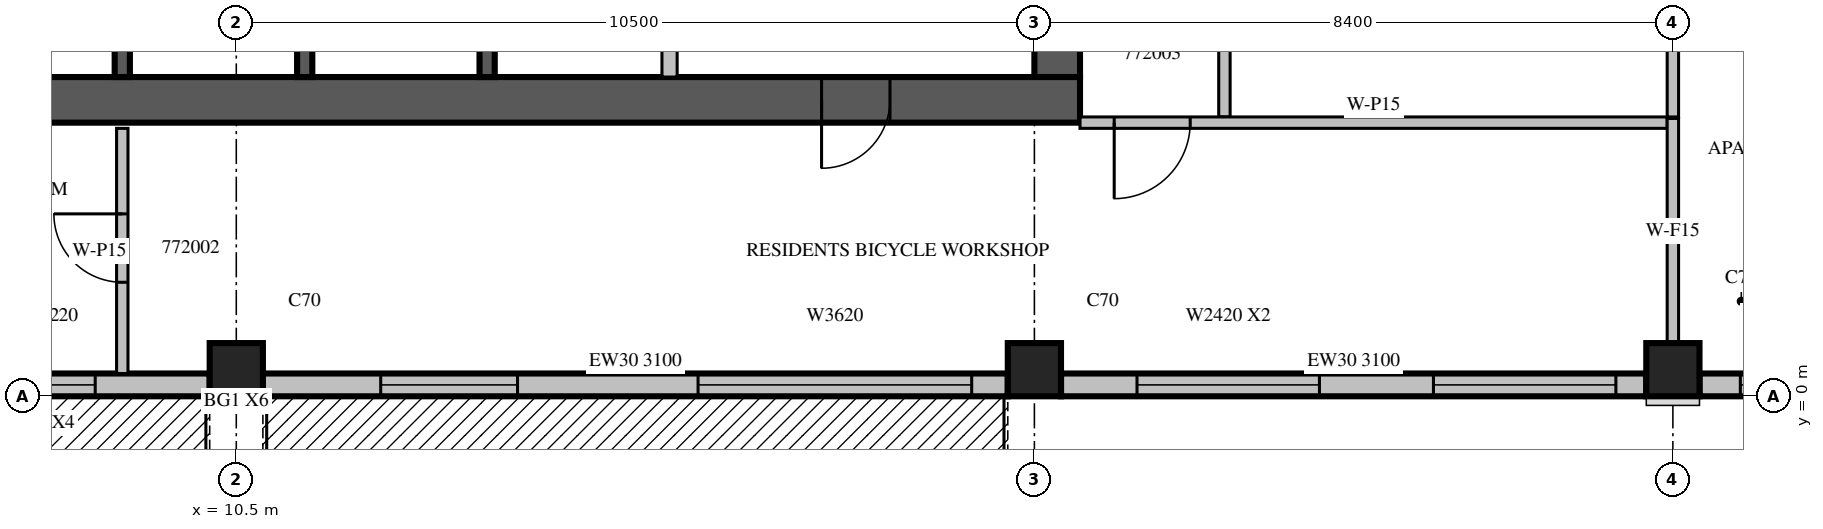
"""IFC4 building model, lengths in metres.
Left out: names, types, materials, properties, quantities, classifications, styles, units other than length and angle.
Written with IfcOpenShell. Run it as: python <this file> out.ifc"""

import sys

from ifc_helpers import new_model, si_unit, direction, frame, frame_2d, origin, origin_2d, place, context, subcontext, project, spatial, rectangle, extrude, source, transform, mapped, element, fill, save


model = new_model("IFC4")
c1 = context("Model", 3, precision=1e-05, world=origin(), true_north=direction((0.0, 1.0)))
c2 = subcontext(c1, "Body", "Model", "MODEL_VIEW")
j1 = project(units=[si_unit("LENGTHUNIT", "METRE"), si_unit("PLANEANGLEUNIT", "RADIAN")], contexts=[c1])
p1 = place(None, origin())
s1 = spatial("IfcSite", under=j1, at=p1, CompositionType="ELEMENT")
p2 = place(p1, origin())
s2 = spatial("IfcBuilding", under=s1, at=p2, CompositionType="ELEMENT")
p3 = place(p2, frame((0.0, 0.0, 312.5)))
s3 = spatial("IfcBuildingStorey", under=s2, at=p3, CompositionType="ELEMENT", Elevation=312.5)
m1 = source(origin(), c2, "Body", "SweptSolid", [
    extrude(rectangle(XDim=0.7, YDim=0.7, at=origin_2d()), origin(), (0.0, 0.0, 1.0), 3.5),
])
for number, where, z_axis, x_axis in (
    (1, (10.5, 0.35, 0.0), (0.0, 0.0, 1.0), (1.0, 0.0, 0.0)),
    (2, (21.0, 0.35, 0.0), (0.0, 0.0, 1.0), (1.0, 0.0, 0.0)),
    (3, (29.4, 0.35, 0.0), (0.0, 0.0, 1.0), (1.0, 0.0, 0.0)),
):
    element("IfcColumn", number, at=place(p3, frame(where, z_axis=z_axis, x_axis=x_axis)), inside=s3, PredefinedType="COLUMN", context=c2, shape_type="MappedRepresentation", body=[
        mapped(m1, transform((0.0, 0.0, 0.0), scale=1.0)),
    ])
m2 = source(origin(), c2, "Body", "SweptSolid", [
    extrude(rectangle(XDim=6.3, YDim=0.6, at=frame_2d((3.15, 0.0))), origin(), (0.0, 0.0, 1.0), 3.5),
])
p4 = place(p3, frame((21.3, 4.2, 0.0), z_axis=(0.0, 0.0, 1.0), x_axis=(0.0, 1.0, 0.0)))
e4 = element("IfcWall", 4, at=p4, inside=s3, PredefinedType="SHEAR", context=c2, shape_type="MappedRepresentation", body=[
    mapped(m2, transform((0.0, 0.0, 0.0), scale=1.0)),
])
m3 = source(origin(), c2, "Body", "SweptSolid", [
    extrude(rectangle(XDim=2.2, YDim=2.1, at=frame_2d((1.1, 1.05))), frame((0.0, 0.31, 0.0), z_axis=(0.0, -1.0, 0.0), x_axis=(1.0, 0.0, 0.0)), (0.0, 0.0, 1.0), 0.62),
])
p5 = place(p4, frame((4.0, 0.0, 0.0)))
e5 = element("IfcOpeningElement", 5, at=p5, cuts=e4, PredefinedType="OPENING", context=c2, shape_type="MappedRepresentation", body=[
    mapped(m3, transform((0.0, 0.0, 0.0), scale=1.0)),
])
m4 = source(origin(), c2, "Body", "SweptSolid", [
    extrude(rectangle(XDim=17.4, YDim=0.6, at=frame_2d((8.7, 0.0))), origin(), (0.0, 0.0, 1.0), 3.5),
])
p6 = place(p3, frame((4.2, 3.9, 0.0), z_axis=(0.0, 0.0, 1.0), x_axis=(1.0, 0.0, 0.0)))
e6 = element("IfcWall", 6, at=p6, inside=s3, PredefinedType="SHEAR", context=c2, shape_type="MappedRepresentation", body=[
    mapped(m4, transform((0.0, 0.0, 0.0), scale=1.0)),
])
m5 = source(origin(), c2, "Body", "SweptSolid", [
    extrude(rectangle(XDim=0.9, YDim=2.1, at=frame_2d((0.45, 1.05))), frame((0.0, 0.31, 0.0), z_axis=(0.0, -1.0, 0.0), x_axis=(1.0, 0.0, 0.0)), (0.0, 0.0, 1.0), 0.62),
])
p7 = place(p6, frame((14.0, 0.0, 0.0)))
e7 = element("IfcOpeningElement", 7, at=p7, cuts=e6, PredefinedType="OPENING", context=c2, shape_type="MappedRepresentation", body=[
    mapped(m5, transform((0.0, 0.0, 0.0), scale=1.0)),
])
m6 = source(origin(), c2, "Body", "SweptSolid", [
    extrude(rectangle(XDim=5.95, YDim=0.3, at=frame_2d((2.975, 0.0))), origin(), (0.0, 0.0, 1.0), 3.1),
])
p8 = place(p3, frame((4.2, 0.15, 0.0), z_axis=(0.0, 0.0, 1.0), x_axis=(1.0, 0.0, 0.0)))
e8 = element("IfcWall", 8, at=p8, inside=s3, PredefinedType="STANDARD", context=c2, shape_type="MappedRepresentation", body=[
    mapped(m6, transform((0.0, 0.0, 0.0), scale=1.0)),
])
m7 = source(origin(), c2, "Body", "SweptSolid", [
    extrude(rectangle(XDim=1.8, YDim=2.4, at=frame_2d((0.9, 1.2))), frame((0.0, 0.16, 0.0), z_axis=(0.0, -1.0, 0.0), x_axis=(1.0, 0.0, 0.0)), (0.0, 0.0, 1.0), 0.32),
])
p9 = place(p8, frame((0.675, 0.0, 0.0)))
e9 = element("IfcOpeningElement", 9, at=p9, cuts=e8, PredefinedType="OPENING", context=c2, shape_type="MappedRepresentation", body=[
    mapped(m7, transform((0.0, 0.0, 0.0), scale=1.0)),
])
m8 = source(origin(), c2, "Body", "SweptSolid", [
    extrude(rectangle(XDim=1.2, YDim=2.0, at=frame_2d((0.6, 1.0))), frame((0.0, 0.16, 0.0), z_axis=(0.0, -1.0, 0.0), x_axis=(1.0, 0.0, 0.0)), (0.0, 0.0, 1.0), 0.32),
])
p10 = place(p8, frame((3.244, 0.0, 0.6)))
e10 = element("IfcOpeningElement", 10, at=p10, cuts=e8, PredefinedType="OPENING", context=c2, shape_type="MappedRepresentation", body=[
    mapped(m8, transform((0.0, 0.0, 0.0), scale=1.0)),
])
m9 = source(origin(), c2, "Body", "SweptSolid", [
    extrude(rectangle(XDim=9.8, YDim=0.3, at=frame_2d((4.9, 0.0))), origin(), (0.0, 0.0, 1.0), 3.1),
])
p11 = place(p3, frame((10.85, 0.15, 0.0), z_axis=(0.0, 0.0, 1.0), x_axis=(1.0, 0.0, 0.0)))
e11 = element("IfcWall", 11, at=p11, inside=s3, PredefinedType="STANDARD", context=c2, shape_type="MappedRepresentation", body=[
    mapped(m9, transform((0.0, 0.0, 0.0), scale=1.0)),
])
p12 = place(p11, frame((1.55, 0.0, 0.0)))
e12 = element("IfcOpeningElement", 12, at=p12, cuts=e11, PredefinedType="OPENING", context=c2, shape_type="MappedRepresentation", body=[
    mapped(m7, transform((0.0, 0.0, 0.0), scale=1.0)),
])
m10 = source(origin(), c2, "Body", "SweptSolid", [
    extrude(rectangle(XDim=3.6, YDim=2.0, at=frame_2d((1.8, 1.0))), frame((0.0, 0.16, 0.0), z_axis=(0.0, -1.0, 0.0), x_axis=(1.0, 0.0, 0.0)), (0.0, 0.0, 1.0), 0.32),
])
p13 = place(p11, frame((5.725, 0.0, 0.6)))
e13 = element("IfcOpeningElement", 13, at=p13, cuts=e11, PredefinedType="OPENING", context=c2, shape_type="MappedRepresentation", body=[
    mapped(m10, transform((0.0, 0.0, 0.0), scale=1.0)),
])
m11 = source(origin(), c2, "Body", "SweptSolid", [
    extrude(rectangle(XDim=7.7, YDim=0.3, at=frame_2d((3.85, 0.0))), origin(), (0.0, 0.0, 1.0), 3.1),
])
p14 = place(p3, frame((21.35, 0.15, 0.0), z_axis=(0.0, 0.0, 1.0), x_axis=(1.0, 0.0, 0.0)))
e14 = element("IfcWall", 14, at=p14, inside=s3, PredefinedType="STANDARD", context=c2, shape_type="MappedRepresentation", body=[
    mapped(m11, transform((0.0, 0.0, 0.0), scale=1.0)),
])
m12 = source(origin(), c2, "Body", "SweptSolid", [
    extrude(rectangle(XDim=2.4, YDim=2.0, at=frame_2d((1.2, 1.0))), frame((0.0, 0.16, 0.0), z_axis=(0.0, -1.0, 0.0), x_axis=(1.0, 0.0, 0.0)), (0.0, 0.0, 1.0), 0.32),
])
p15 = place(p14, frame((1.0, 0.0, 0.6)))
e15 = element("IfcOpeningElement", 15, at=p15, cuts=e14, PredefinedType="OPENING", context=c2, shape_type="MappedRepresentation", body=[
    mapped(m12, transform((0.0, 0.0, 0.0), scale=1.0)),
])
p16 = place(p14, frame((4.9, 0.0, 0.6)))
e16 = element("IfcOpeningElement", 16, at=p16, cuts=e14, PredefinedType="OPENING", context=c2, shape_type="MappedRepresentation", body=[
    mapped(m12, transform((0.0, 0.0, 0.0), scale=1.0)),
])
p17 = place(p3, frame((29.75, 0.15, 0.0), z_axis=(0.0, 0.0, 1.0), x_axis=(1.0, 0.0, 0.0)))
e17 = element("IfcWall", 17, at=p17, inside=s3, PredefinedType="STANDARD", context=c2, shape_type="MappedRepresentation", body=[
    mapped(m11, transform((0.0, 0.0, 0.0), scale=1.0)),
])
p18 = place(p17, frame((0.537, 0.0, 0.6)))
e18 = element("IfcOpeningElement", 18, at=p18, cuts=e17, PredefinedType="OPENING", context=c2, shape_type="MappedRepresentation", body=[
    mapped(m8, transform((0.0, 0.0, 0.0), scale=1.0)),
])
p19 = place(p17, frame((6.062, 0.0, 0.6)))
e19 = element("IfcOpeningElement", 19, at=p19, cuts=e17, PredefinedType="OPENING", context=c2, shape_type="MappedRepresentation", body=[
    mapped(m8, transform((0.0, 0.0, 0.0), scale=1.0)),
])
m13 = source(origin(), c2, "Body", "SweptSolid", [
    extrude(rectangle(XDim=3.1, YDim=0.2, at=frame_2d((1.55, 0.0))), origin(), (0.0, 0.0, 1.0), 3.5),
])
for number, where, z_axis, x_axis in (
    (20, (9.0, 4.2, 0.0), (0.0, 0.0, 1.0), (0.0, 1.0, 0.0)),
    (21, (11.4, 4.2, 0.0), (0.0, 0.0, 1.0), (0.0, 1.0, 0.0)),
):
    element("IfcWall", number, at=place(p3, frame(where, z_axis=z_axis, x_axis=x_axis)), inside=s3, PredefinedType="SOLIDWALL", context=c2, shape_type="MappedRepresentation", body=[
        mapped(m13, transform((0.0, 0.0, 0.0), scale=1.0)),
    ])
m14 = source(origin(), c2, "Body", "SweptSolid", [
    extrude(rectangle(XDim=3.1, YDim=0.2, at=frame_2d((1.55, 0.0))), origin(), (0.0, 0.0, 1.0), 3.1),
])
p20 = place(p3, frame((13.8, 4.2, 0.0), z_axis=(0.0, 0.0, 1.0), x_axis=(0.0, 1.0, 0.0)))
e22 = element("IfcWall", 22, at=p20, inside=s3, PredefinedType="SOLIDWALL", context=c2, shape_type="MappedRepresentation", body=[
    mapped(m14, transform((0.0, 0.0, 0.0), scale=1.0)),
])
m15 = source(origin(), c2, "Body", "SweptSolid", [
    extrude(rectangle(XDim=3.1, YDim=0.2, at=frame_2d((1.55, 0.0))), origin(), (0.0, 0.0, 1.0), 3.1),
])
p21 = place(p3, frame((16.2, 4.2, 0.0), z_axis=(0.0, 0.0, 1.0), x_axis=(0.0, 1.0, 0.0)))
e23 = element("IfcWall", 23, at=p21, inside=s3, PredefinedType="PARTITIONING", context=c2, shape_type="MappedRepresentation", body=[
    mapped(m15, transform((0.0, 0.0, 0.0), scale=1.0)),
])
m16 = source(origin(), c2, "Body", "SweptSolid", [
    extrude(rectangle(XDim=4.275, YDim=0.15, at=frame_2d((2.138, 0.0))), origin(), (0.0, 0.0, 1.0), 3.1),
])
for number, where, z_axis, x_axis in (
    (24, (23.5, 7.95, 0.0), (0.0, 0.0, 1.0), (0.0, -1.0, 0.0)),
    (25, (29.4, 3.675, 0.0), (0.0, 0.0, 1.0), (0.0, 1.0, 0.0)),
):
    element("IfcWall", number, at=place(p3, frame(where, z_axis=z_axis, x_axis=x_axis)), inside=s3, PredefinedType="PARTITIONING", context=c2, shape_type="MappedRepresentation", body=[
        mapped(m16, transform((0.0, 0.0, 0.0), scale=1.0)),
    ])
m17 = source(origin(), c2, "Body", "SweptSolid", [
    extrude(rectangle(XDim=3.225, YDim=0.15, at=frame_2d((1.613, 0.0))), origin(), (0.0, 0.0, 1.0), 3.1),
])
p22 = place(p3, frame((9.0, 3.525, 0.0), z_axis=(0.0, 0.0, 1.0), x_axis=(0.0, -1.0, 0.0)))
e26 = element("IfcWall", 26, at=p22, inside=s3, PredefinedType="PARTITIONING", context=c2, shape_type="MappedRepresentation", body=[
    mapped(m17, transform((0.0, 0.0, 0.0), scale=1.0)),
])
m18 = source(origin(), c2, "Body", "SweptSolid", [
    extrude(rectangle(XDim=0.9, YDim=2.1, at=frame_2d((0.45, 1.05))), frame((0.0, 0.085, 0.0), z_axis=(0.0, -1.0, 0.0), x_axis=(1.0, 0.0, 0.0)), (0.0, 0.0, 1.0), 0.17),
])
p23 = place(p22, frame((1.125, 0.0, 0.0)))
e27 = element("IfcOpeningElement", 27, at=p23, cuts=e26, PredefinedType="OPENING", context=c2, shape_type="MappedRepresentation", body=[
    mapped(m18, transform((0.0, 0.0, 0.0), scale=1.0)),
])
m19 = source(origin(), c2, "Body", "SweptSolid", [
    extrude(rectangle(XDim=7.725, YDim=0.15, at=frame_2d((3.862, 0.0))), origin(), (0.0, 0.0, 1.0), 3.1),
])
p24 = place(p3, frame((21.6, 3.6, 0.0), z_axis=(0.0, 0.0, 1.0), x_axis=(1.0, 0.0, 0.0)))
e28 = element("IfcWall", 28, at=p24, inside=s3, PredefinedType="PARTITIONING", context=c2, shape_type="MappedRepresentation", body=[
    mapped(m19, transform((0.0, 0.0, 0.0), scale=1.0)),
])
m20 = source(origin(), c2, "Body", "SweptSolid", [
    extrude(rectangle(XDim=1.0, YDim=2.1, at=frame_2d((0.5, 1.05))), frame((0.0, 0.085, 0.0), z_axis=(0.0, -1.0, 0.0), x_axis=(1.0, 0.0, 0.0)), (0.0, 0.0, 1.0), 0.17),
])
p25 = place(p24, frame((0.45, 0.0, 0.0)))
e29 = element("IfcOpeningElement", 29, at=p25, cuts=e28, PredefinedType="OPENING", context=c2, shape_type="MappedRepresentation", body=[
    mapped(m20, transform((0.0, 0.0, 0.0), scale=1.0)),
])
m21 = source(origin(), c2, "Body", "SweptSolid", [
    extrude(rectangle(XDim=2.956, YDim=0.15, at=frame_2d((1.478, 0.0))), origin(), (0.0, 0.0, 1.0), 3.1),
])
p26 = place(p3, frame((29.4, 0.699, 0.0), z_axis=(0.0, 0.0, 1.0), x_axis=(0.0, 1.0, 0.0)))
e30 = element("IfcWall", 30, at=p26, inside=s3, PredefinedType="PARTITIONING", context=c2, shape_type="MappedRepresentation", body=[
    mapped(m21, transform((0.0, 0.0, 0.0), scale=1.0)),
])
m22 = source(origin(), c2, "Body", "SweptSolid", [
    extrude(rectangle(XDim=1.2, YDim=2.0, at=frame_2d((0.6, 1.0))), frame((0.0, 0.03, 0.0), z_axis=(0.0, -1.0, 0.0), x_axis=(1.0, 0.0, 0.0)), (0.0, 0.0, 1.0), 0.06),
])
p27 = place(p10, origin())
e31 = element("IfcWindow", 31, at=p27, inside=s3, PartitioningType="SINGLE_PANEL", PredefinedType="WINDOW", context=c2, shape_type="MappedRepresentation", body=[
    mapped(m22, transform((0.0, 0.0, 0.0), scale=1.0)),
])
fill(e10, e31)
m23 = source(origin(), c2, "Body", "SweptSolid", [
    extrude(rectangle(XDim=1.8, YDim=2.4, at=frame_2d((0.9, 1.2))), frame((0.0, 0.025, 0.0), z_axis=(0.0, -1.0, 0.0), x_axis=(1.0, 0.0, 0.0)), (0.0, 0.0, 1.0), 0.05),
])
p28 = place(p12, origin())
e32 = element("IfcDoor", 32, at=p28, inside=s3, OperationType="SLIDING_TO_LEFT", PredefinedType="DOOR", context=c2, shape_type="MappedRepresentation", body=[
    mapped(m23, transform((0.0, 0.0, 0.0), scale=1.0)),
])
fill(e12, e32)
m24 = source(origin(), c2, "Body", "SweptSolid", [
    extrude(rectangle(XDim=3.6, YDim=2.0, at=frame_2d((1.8, 1.0))), frame((0.0, 0.03, 0.0), z_axis=(0.0, -1.0, 0.0), x_axis=(1.0, 0.0, 0.0)), (0.0, 0.0, 1.0), 0.06),
])
p29 = place(p13, origin())
e33 = element("IfcWindow", 33, at=p29, inside=s3, PartitioningType="SINGLE_PANEL", PredefinedType="WINDOW", context=c2, shape_type="MappedRepresentation", body=[
    mapped(m24, transform((0.0, 0.0, 0.0), scale=1.0)),
])
fill(e13, e33)
m25 = source(origin(), c2, "Body", "SweptSolid", [
    extrude(rectangle(XDim=2.4, YDim=2.0, at=frame_2d((1.2, 1.0))), frame((0.0, 0.03, 0.0), z_axis=(0.0, -1.0, 0.0), x_axis=(1.0, 0.0, 0.0)), (0.0, 0.0, 1.0), 0.06),
])
p30 = place(p15, origin())
e34 = element("IfcWindow", 34, at=p30, inside=s3, PartitioningType="SINGLE_PANEL", PredefinedType="WINDOW", context=c2, shape_type="MappedRepresentation", body=[
    mapped(m25, transform((0.0, 0.0, 0.0), scale=1.0)),
])
fill(e15, e34)
p31 = place(p16, origin())
e35 = element("IfcWindow", 35, at=p31, inside=s3, PartitioningType="SINGLE_PANEL", PredefinedType="WINDOW", context=c2, shape_type="MappedRepresentation", body=[
    mapped(m25, transform((0.0, 0.0, 0.0), scale=1.0)),
])
fill(e16, e35)
p32 = place(p18, origin())
e36 = element("IfcWindow", 36, at=p32, inside=s3, PartitioningType="SINGLE_PANEL", PredefinedType="WINDOW", context=c2, shape_type="MappedRepresentation", body=[
    mapped(m22, transform((0.0, 0.0, 0.0), scale=1.0)),
])
fill(e18, e36)
m26 = source(origin(), c2, "Body", "SweptSolid", [
    extrude(rectangle(XDim=0.9, YDim=2.1, at=frame_2d((0.45, 1.05))), frame((0.0, 0.025, 0.0), z_axis=(0.0, -1.0, 0.0), x_axis=(1.0, 0.0, 0.0)), (0.0, 0.0, 1.0), 0.05),
])
p33 = place(p7, origin())
e37 = element("IfcDoor", 37, at=p33, inside=s3, OperationType="SINGLE_SWING_RIGHT", PredefinedType="DOOR", context=c2, shape_type="MappedRepresentation", body=[
    mapped(m26, transform((0.0, 0.0, 0.0), scale=1.0)),
])
fill(e7, e37)
p34 = place(p23, origin())
e38 = element("IfcDoor", 38, at=p34, inside=s3, OperationType="SINGLE_SWING_RIGHT", PredefinedType="DOOR", context=c2, shape_type="MappedRepresentation", body=[
    mapped(m26, transform((0.0, 0.0, 0.0), scale=1.0)),
])
fill(e27, e38)
m27 = source(origin(), c2, "Body", "SweptSolid", [
    extrude(rectangle(XDim=1.0, YDim=2.1, at=frame_2d((0.5, 1.05))), frame((0.0, 0.025, 0.0), z_axis=(0.0, -1.0, 0.0), x_axis=(1.0, 0.0, 0.0)), (0.0, 0.0, 1.0), 0.05),
])
p35 = place(p25, origin())
e39 = element("IfcDoor", 39, at=p35, inside=s3, OperationType="SINGLE_SWING_RIGHT", PredefinedType="DOOR", context=c2, shape_type="MappedRepresentation", body=[
    mapped(m27, transform((0.0, 0.0, 0.0), scale=1.0)),
])
fill(e29, e39)
save(model, sys.argv[1])
